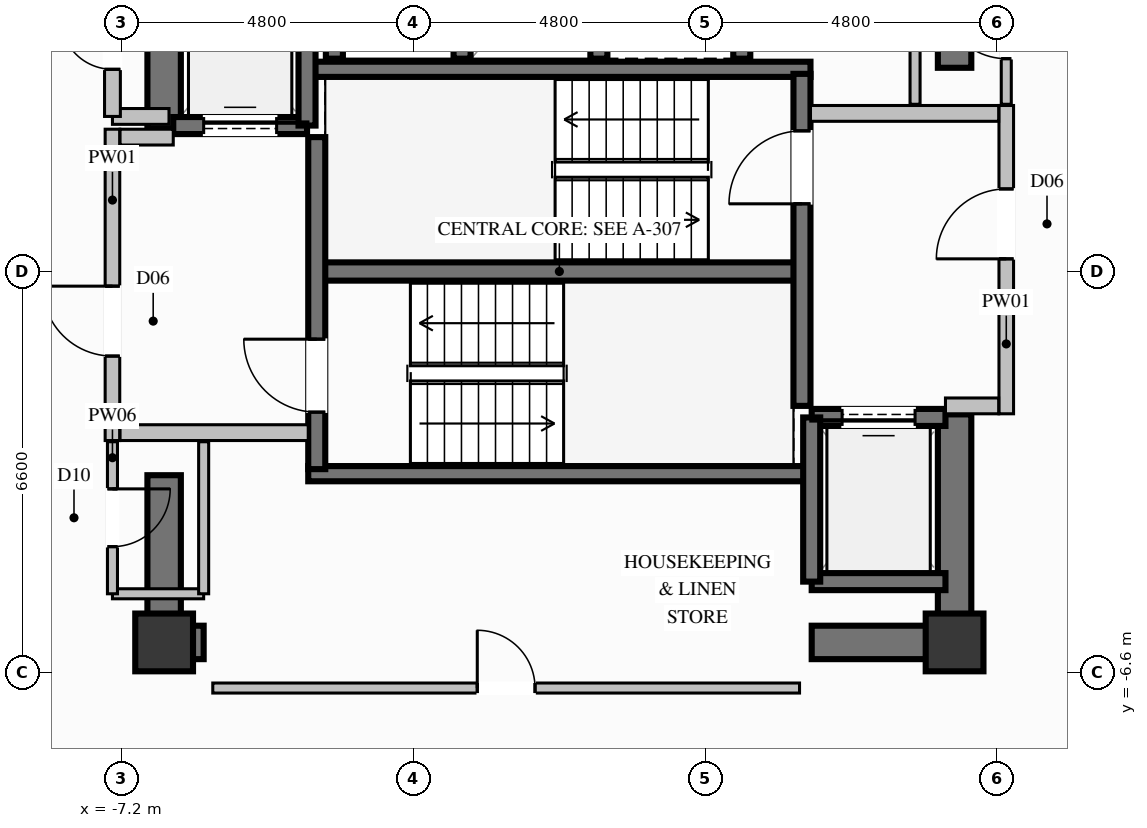
"""IFC4 building model, lengths in metres.
Left out: names, types, materials, properties, quantities, classifications, styles, units other than length and angle.
Written with IfcOpenShell. Run it as: python <this file> out.ifc"""

import sys

from ifc_helpers import new_model, si_unit, direction, frame, frame_2d, origin, origin_2d, place, context, subcontext, project, spatial, rectangle, extrude, element, fill, save


model = new_model("IFC4")
c1 = context("Model", 3, precision=1e-05, world=origin(), true_north=direction((0.0, 1.0)))
c2 = subcontext(c1, "Body", "Model", "MODEL_VIEW")
j1 = project(units=[si_unit("LENGTHUNIT", "METRE"), si_unit("PLANEANGLEUNIT", "RADIAN")], contexts=[c1])
p1 = place(None, origin())
s1 = spatial("IfcSite", under=j1, at=p1, CompositionType="ELEMENT")
p2 = place(p1, origin())
s2 = spatial("IfcBuilding", under=s1, at=p2, CompositionType="ELEMENT")
p3 = place(p2, frame((0.0, 0.0, 220.0)))
s3 = spatial("IfcBuildingStorey", under=s2, at=p3, CompositionType="ELEMENT", Elevation=220.0)
for number, where, z_axis, x_axis in (
    (1, (-6.5, -6.1, 0.0), (0.0, 0.0, 1.0), (1.0, 0.0, 0.0)),
    (2, (6.5, -6.1, 0.0), (0.0, 0.0, 1.0), (1.0, 0.0, 0.0)),
):
    element("IfcColumn", number, at=place(p3, frame(where, z_axis=z_axis, x_axis=x_axis)), inside=s3, PredefinedType="COLUMN", context=c2, shape_type="SweptSolid", body=[
        extrude(rectangle(XDim=0.95, YDim=0.95, at=origin_2d()), origin(), (0.0, 0.0, 1.0), 3.6),
    ])
p4 = place(p3, frame((-3.99, 0.0, 0.0), z_axis=(0.0, 0.0, 1.0), x_axis=(1.0, 0.0, 0.0)))
e3 = element("IfcWall", 3, at=p4, inside=s3, PredefinedType="SHEAR", context=c2, shape_type="SweptSolid", body=[
    extrude(rectangle(XDim=7.98, YDim=0.3, at=frame_2d((3.99, 0.0))), origin(), (0.0, 0.0, 1.0), 3.6),
])
for number, where, z_axis, x_axis in (
    (4, (-4.13, -3.325, 0.0), (0.0, 0.0, 1.0), (1.0, 0.0, 0.0)),
    (5, (-4.13, 3.325, 0.0), (0.0, 0.0, 1.0), (1.0, 0.0, 0.0)),
):
    element("IfcWall", number, at=place(p3, frame(where, z_axis=z_axis, x_axis=x_axis)), inside=s3, PredefinedType="SOLIDWALL", context=c2, shape_type="SweptSolid", body=[
        extrude(rectangle(XDim=8.26, YDim=0.25, at=frame_2d((4.13, 0.0))), origin(), (0.0, 0.0, 1.0), 3.6),
    ])
p5 = place(p3, frame((-6.225, -6.1, 0.0), z_axis=(0.0, 0.0, 1.0), x_axis=(1.0, 0.0, 0.0)))
e6 = element("IfcWall", 6, at=p5, inside=s3, PredefinedType="SHEAR", context=c2, shape_type="SweptSolid", body=[
    extrude(rectangle(XDim=0.375, YDim=0.55, at=frame_2d((0.188, 0.0))), origin(), (0.0, 0.0, 1.0), 3.6),
])
p6 = place(p3, frame((4.15, -6.1, 0.0), z_axis=(0.0, 0.0, 1.0), x_axis=(1.0, 0.0, 0.0)))
e7 = element("IfcWall", 7, at=p6, inside=s3, PredefinedType="SHEAR", context=c2, shape_type="SweptSolid", body=[
    extrude(rectangle(XDim=2.075, YDim=0.55, at=frame_2d((1.038, 0.0))), origin(), (0.0, 0.0, 1.0), 3.6),
])
p7 = place(p3, frame((-6.5, 2.35, 0.0), z_axis=(0.0, 0.0, 1.0), x_axis=(0.0, 1.0, 0.0)))
e8 = element("IfcWall", 8, at=p7, inside=s3, PredefinedType="SHEAR", context=c2, shape_type="SweptSolid", body=[
    extrude(rectangle(XDim=4.025, YDim=0.55, at=frame_2d((2.012, 0.0))), origin(), (0.0, 0.0, 1.0), 3.6),
])
p8 = place(p3, frame((-6.5, -6.375, 0.0), z_axis=(0.0, 0.0, 1.0), x_axis=(0.0, 1.0, 0.0)))
e9 = element("IfcWall", 9, at=p8, inside=s3, PredefinedType="SHEAR", context=c2, shape_type="SweptSolid", body=[
    extrude(rectangle(XDim=3.025, YDim=0.55, at=frame_2d((1.512, 0.0))), origin(), (0.0, 0.0, 1.0), 3.6),
])
p9 = place(p3, frame((6.5, -6.375, 0.0), z_axis=(0.0, 0.0, 1.0), x_axis=(0.0, 1.0, 0.0)))
e10 = element("IfcWall", 10, at=p9, inside=s3, PredefinedType="SHEAR", context=c2, shape_type="SweptSolid", body=[
    extrude(rectangle(XDim=4.025, YDim=0.55, at=frame_2d((2.012, 0.0))), origin(), (0.0, 0.0, 1.0), 3.6),
])
p10 = place(p3, frame((6.5, 3.35, 0.0), z_axis=(0.0, 0.0, 1.0), x_axis=(0.0, 1.0, 0.0)))
e11 = element("IfcWall", 11, at=p10, inside=s3, PredefinedType="SHEAR", context=c2, shape_type="SweptSolid", body=[
    extrude(rectangle(XDim=3.025, YDim=0.55, at=frame_2d((1.512, 0.0))), origin(), (0.0, 0.0, 1.0), 3.6),
])
for number, where, z_axis, x_axis in (
    (12, (-3.7, 6.0, 0.0), (0.0, 0.0, 1.0), (0.0, -1.0, 0.0)),
    (13, (-1.6, 3.5, 0.0), (0.0, 0.0, 1.0), (0.0, 1.0, 0.0)),
    (14, (0.65, 3.5, 0.0), (0.0, 0.0, 1.0), (0.0, 1.0, 0.0)),
    (15, (3.0, 3.5, 0.0), (0.0, 0.0, 1.0), (0.0, 1.0, 0.0)),
):
    element("IfcWall", number, at=place(p3, frame(where, z_axis=z_axis, x_axis=x_axis)), inside=s3, PredefinedType="SOLIDWALL", context=c2, shape_type="SweptSolid", body=[
        extrude(rectangle(XDim=2.5, YDim=0.28, at=frame_2d((1.25, 0.0))), origin(), (0.0, 0.0, 1.0), 3.36),
    ])
p11 = place(p3, frame((-6.35, 2.4, 0.0), z_axis=(0.0, 0.0, 1.0), x_axis=(1.0, 0.0, 0.0)))
e16 = element("IfcWall", 16, at=p11, inside=s3, PredefinedType="SOLIDWALL", context=c2, shape_type="SweptSolid", body=[
    extrude(rectangle(XDim=2.2, YDim=0.28, at=frame_2d((1.1, 0.0))), origin(), (0.0, 0.0, 1.0), 3.36),
])
p12 = place(p11, frame((0.5, 0.0, 0.0)))
e17 = element("IfcOpeningElement", 17, at=p12, cuts=e16, PredefinedType="OPENING", context=c2, shape_type="SweptSolid", body=[
    extrude(rectangle(XDim=1.2, YDim=2.2, at=frame_2d((0.6, 1.1))), frame((0.0, 0.15, 0.0), z_axis=(0.0, -1.0, 0.0), x_axis=(1.0, 0.0, 0.0)), (0.0, 0.0, 1.0), 0.3),
])
p13 = place(p3, frame((-4.15, 2.4, 0.0), z_axis=(0.0, 0.0, 1.0), x_axis=(0.0, 1.0, 0.0)))
e18 = element("IfcWall", 18, at=p13, inside=s3, PredefinedType="SOLIDWALL", context=c2, shape_type="SweptSolid", body=[
    extrude(rectangle(XDim=2.7, YDim=0.28, at=frame_2d((1.35, 0.0))), origin(), (0.0, 0.0, 1.0), 3.36),
])
p14 = place(p3, frame((4.15, -5.1, 0.0), z_axis=(0.0, 0.0, 1.0), x_axis=(1.0, 0.0, 0.0)))
e19 = element("IfcWall", 19, at=p14, inside=s3, PredefinedType="SOLIDWALL", context=c2, shape_type="SweptSolid", body=[
    extrude(rectangle(XDim=2.2, YDim=0.28, at=frame_2d((1.1, 0.0))), origin(), (0.0, 0.0, 1.0), 3.36),
])
p15 = place(p3, frame((6.35, -2.4, 0.0), z_axis=(0.0, 0.0, 1.0), x_axis=(-1.0, 0.0, 0.0)))
e20 = element("IfcWall", 20, at=p15, inside=s3, PredefinedType="SOLIDWALL", context=c2, shape_type="SweptSolid", body=[
    extrude(rectangle(XDim=2.2, YDim=0.28, at=frame_2d((1.1, 0.0))), origin(), (0.0, 0.0, 1.0), 3.36),
])
p16 = place(p15, frame((0.5, 0.0, 0.0)))
e21 = element("IfcOpeningElement", 21, at=p16, cuts=e20, PredefinedType="OPENING", context=c2, shape_type="SweptSolid", body=[
    extrude(rectangle(XDim=1.2, YDim=2.2, at=frame_2d((0.6, 1.1))), frame((0.0, 0.15, 0.0), z_axis=(0.0, -1.0, 0.0), x_axis=(1.0, 0.0, 0.0)), (0.0, 0.0, 1.0), 0.3),
])
p17 = place(p3, frame((4.15, -2.4, 0.0), z_axis=(0.0, 0.0, 1.0), x_axis=(0.0, -1.0, 0.0)))
e22 = element("IfcWall", 22, at=p17, inside=s3, PredefinedType="SOLIDWALL", context=c2, shape_type="SweptSolid", body=[
    extrude(rectangle(XDim=2.7, YDim=0.28, at=frame_2d((1.35, 0.0))), origin(), (0.0, 0.0, 1.0), 3.36),
])
p18 = place(p3, frame((-3.99, -3.25, 0.0), z_axis=(0.0, 0.0, 1.0), x_axis=(0.0, 1.0, 0.0)))
e23 = element("IfcWall", 23, at=p18, inside=s3, PredefinedType="SOLIDWALL", context=c2, shape_type="SweptSolid", body=[
    extrude(rectangle(XDim=5.46, YDim=0.28, at=frame_2d((2.73, 0.0))), origin(), (0.0, 0.0, 1.0), 3.36),
])
p19 = place(p18, frame((0.937, 0.0, 0.0)))
e24 = element("IfcOpeningElement", 24, at=p19, cuts=e23, PredefinedType="OPENING", context=c2, shape_type="SweptSolid", body=[
    extrude(rectangle(XDim=1.2, YDim=2.2, at=frame_2d((0.6, 1.1))), frame((0.0, 0.15, 0.0), z_axis=(0.0, -1.0, 0.0), x_axis=(1.0, 0.0, 0.0)), (0.0, 0.0, 1.0), 0.3),
])
p20 = place(p3, frame((3.99, -2.21, 0.0), z_axis=(0.0, 0.0, 1.0), x_axis=(0.0, 1.0, 0.0)))
e25 = element("IfcWall", 25, at=p20, inside=s3, PredefinedType="SOLIDWALL", context=c2, shape_type="SweptSolid", body=[
    extrude(rectangle(XDim=5.46, YDim=0.28, at=frame_2d((2.73, 0.0))), origin(), (0.0, 0.0, 1.0), 3.36),
])
p21 = place(p20, frame((3.323, 0.0, 0.0)))
e26 = element("IfcOpeningElement", 26, at=p21, cuts=e25, PredefinedType="OPENING", context=c2, shape_type="SweptSolid", body=[
    extrude(rectangle(XDim=1.2, YDim=2.2, at=frame_2d((0.6, 1.1))), frame((0.0, 0.15, 0.0), z_axis=(0.0, -1.0, 0.0), x_axis=(1.0, 0.0, 0.0)), (0.0, 0.0, 1.0), 0.3),
])
p22 = place(p3, frame((-7.35, -2.78, 0.0), z_axis=(0.0, 0.0, 1.0), x_axis=(0.0, 1.0, 0.0)))
e27 = element("IfcWall", 27, at=p22, inside=s3, PredefinedType="PARTITIONING", context=c2, shape_type="SweptSolid", body=[
    extrude(rectangle(XDim=5.12, YDim=0.24, at=frame_2d((2.56, 0.0))), origin(), (0.0, 0.0, 1.0), 2.445),
])
p23 = place(p22, frame((1.389, 0.0, 0.0)))
e28 = element("IfcOpeningElement", 28, at=p23, cuts=e27, PredefinedType="OPENING", context=c2, shape_type="SweptSolid", body=[
    extrude(rectangle(XDim=1.15, YDim=2.2, at=frame_2d((0.575, 1.1))), frame((0.0, 0.13, 0.0), z_axis=(0.0, -1.0, 0.0), x_axis=(1.0, 0.0, 0.0)), (0.0, 0.0, 1.0), 0.26),
])
p24 = place(p3, frame((-7.225, -2.65, 0.0), z_axis=(0.0, 0.0, 1.0), x_axis=(1.0, 0.0, 0.0)))
e29 = element("IfcWall", 29, at=p24, inside=s3, PredefinedType="PARTITIONING", context=c2, shape_type="SweptSolid", body=[
    extrude(rectangle(XDim=3.095, YDim=0.26, at=frame_2d((1.548, 0.0))), origin(), (0.0, 0.0, 1.0), 3.36),
])
p25 = place(p3, frame((-7.225, 2.21, 0.0), z_axis=(0.0, 0.0, 1.0), x_axis=(1.0, 0.0, 0.0)))
e30 = element("IfcWall", 30, at=p25, inside=s3, PredefinedType="PARTITIONING", context=c2, shape_type="SweptSolid", body=[
    extrude(rectangle(XDim=0.875, YDim=0.26, at=frame_2d((0.438, 0.0))), origin(), (0.0, 0.0, 1.0), 3.36),
])
p26 = place(p3, frame((7.35, -2.34, 0.0), z_axis=(0.0, 0.0, 1.0), x_axis=(0.0, 1.0, 0.0)))
e31 = element("IfcWall", 31, at=p26, inside=s3, PredefinedType="PARTITIONING", context=c2, shape_type="SweptSolid", body=[
    extrude(rectangle(XDim=5.07, YDim=0.24, at=frame_2d((2.535, 0.0))), origin(), (0.0, 0.0, 1.0), 2.445),
])
p27 = place(p26, frame((2.548, 0.0, 0.0)))
e32 = element("IfcOpeningElement", 32, at=p27, cuts=e31, PredefinedType="OPENING", context=c2, shape_type="SweptSolid", body=[
    extrude(rectangle(XDim=1.15, YDim=2.2, at=frame_2d((0.575, 1.1))), frame((0.0, 0.13, 0.0), z_axis=(0.0, -1.0, 0.0), x_axis=(1.0, 0.0, 0.0)), (0.0, 0.0, 1.0), 0.26),
])
p28 = place(p3, frame((6.35, -2.21, 0.0), z_axis=(0.0, 0.0, 1.0), x_axis=(1.0, 0.0, 0.0)))
e33 = element("IfcWall", 33, at=p28, inside=s3, PredefinedType="PARTITIONING", context=c2, shape_type="SweptSolid", body=[
    extrude(rectangle(XDim=0.875, YDim=0.26, at=frame_2d((0.438, 0.0))), origin(), (0.0, 0.0, 1.0), 3.36),
])
p29 = place(p3, frame((4.13, 2.6, 0.0), z_axis=(0.0, 0.0, 1.0), x_axis=(1.0, 0.0, 0.0)))
e34 = element("IfcWall", 34, at=p29, inside=s3, PredefinedType="PARTITIONING", context=c2, shape_type="SweptSolid", body=[
    extrude(rectangle(XDim=3.095, YDim=0.26, at=frame_2d((1.548, 0.0))), origin(), (0.0, 0.0, 1.0), 3.36),
])
p30 = place(p3, frame((-7.35, 2.55, 0.0), z_axis=(0.0, 0.0, 1.0), x_axis=(1.0, 0.0, 0.0)))
e35 = element("IfcWall", 35, at=p30, inside=s3, PredefinedType="PARTITIONING", context=c2, shape_type="SweptSolid", body=[
    extrude(rectangle(XDim=0.93, YDim=0.26, at=frame_2d((0.465, 0.0))), origin(), (0.0, 0.0, 1.0), 3.36),
])
p31 = place(p3, frame((-7.35, 2.55, 0.0), z_axis=(0.0, 0.0, 1.0), x_axis=(0.0, 1.0, 0.0)))
e36 = element("IfcWall", 36, at=p31, inside=s3, PredefinedType="PARTITIONING", context=c2, shape_type="SweptSolid", body=[
    extrude(rectangle(XDim=2.4, YDim=0.26, at=frame_2d((1.2, 0.0))), origin(), (0.0, 0.0, 1.0), 2.445),
])
p32 = place(p31, frame((0.775, 0.0, 0.0)))
e37 = element("IfcOpeningElement", 37, at=p32, cuts=e36, PredefinedType="OPENING", context=c2, shape_type="SweptSolid", body=[
    extrude(rectangle(XDim=0.85, YDim=2.05, at=frame_2d((0.425, 1.025))), frame((0.0, 0.14, 0.0), z_axis=(0.0, -1.0, 0.0), x_axis=(1.0, 0.0, 0.0)), (0.0, 0.0, 1.0), 0.28),
])
p33 = place(p3, frame((-7.35, -5.3, 0.0), z_axis=(0.0, 0.0, 1.0), x_axis=(1.0, 0.0, 0.0)))
e38 = element("IfcWall", 38, at=p33, inside=s3, PredefinedType="PARTITIONING", context=c2, shape_type="SweptSolid", body=[
    extrude(rectangle(XDim=1.5, YDim=0.165, at=frame_2d((0.75, 0.0))), origin(), (0.0, 0.0, 1.0), 2.445),
])
p34 = place(p3, frame((-5.85, -5.3, 0.0), z_axis=(0.0, 0.0, 1.0), x_axis=(0.0, 1.0, 0.0)))
e39 = element("IfcWall", 39, at=p34, inside=s3, PredefinedType="PARTITIONING", context=c2, shape_type="SweptSolid", body=[
    extrude(rectangle(XDim=2.5, YDim=0.165, at=frame_2d((1.25, 0.0))), origin(), (0.0, 0.0, 1.0), 2.445),
])
p35 = place(p3, frame((-7.35, -2.8, 0.0), z_axis=(0.0, 0.0, 1.0), x_axis=(0.0, -1.0, 0.0)))
e40 = element("IfcWall", 40, at=p35, inside=s3, PredefinedType="PARTITIONING", context=c2, shape_type="SweptSolid", body=[
    extrude(rectangle(XDim=2.5, YDim=0.165, at=frame_2d((1.25, 0.0))), origin(), (0.0, 0.0, 1.0), 3.36),
])
p36 = place(p35, frame((0.775, 0.0, 0.0)))
e41 = element("IfcOpeningElement", 41, at=p36, cuts=e40, PredefinedType="OPENING", context=c2, shape_type="SweptSolid", body=[
    extrude(rectangle(XDim=0.95, YDim=2.1, at=frame_2d((0.475, 1.05))), frame((0.0, 0.093, 0.0), z_axis=(0.0, -1.0, 0.0), x_axis=(1.0, 0.0, 0.0)), (0.0, 0.0, 1.0), 0.185),
])
p37 = place(p3, frame((7.35, 2.75, 0.0), z_axis=(0.0, 0.0, 1.0), x_axis=(0.0, 1.0, 0.0)))
e42 = element("IfcWall", 42, at=p37, inside=s3, PredefinedType="PARTITIONING", context=c2, shape_type="SweptSolid", body=[
    extrude(rectangle(XDim=2.55, YDim=0.165, at=frame_2d((1.275, 0.0))), origin(), (0.0, 0.0, 1.0), 3.36),
])
p38 = place(p37, frame((0.75, 0.0, 0.0)))
e43 = element("IfcOpeningElement", 43, at=p38, cuts=e42, PredefinedType="OPENING", context=c2, shape_type="SweptSolid", body=[
    extrude(rectangle(XDim=1.05, YDim=2.15, at=frame_2d((0.525, 1.075))), frame((0.0, 0.093, 0.0), z_axis=(0.0, -1.0, 0.0), x_axis=(1.0, 0.0, 0.0)), (0.0, 0.0, 1.0), 0.185),
])
p39 = place(p3, frame((5.85, 5.3, 0.0), z_axis=(0.0, 0.0, 1.0), x_axis=(0.0, -1.0, 0.0)))
e44 = element("IfcWall", 44, at=p39, inside=s3, PredefinedType="PARTITIONING", context=c2, shape_type="SweptSolid", body=[
    extrude(rectangle(XDim=2.55, YDim=0.165, at=frame_2d((1.275, 0.0))), origin(), (0.0, 0.0, 1.0), 2.445),
])
p40 = place(p3, frame((-5.7, -6.85, 0.0), z_axis=(0.0, 0.0, 1.0), x_axis=(1.0, 0.0, 0.0)))
e45 = element("IfcWall", 45, at=p40, inside=s3, PredefinedType="PARTITIONING", context=c2, shape_type="SweptSolid", body=[
    extrude(rectangle(XDim=9.65, YDim=0.165, at=frame_2d((4.825, 0.0))), origin(), (0.0, 0.0, 1.0), 2.445),
])
p41 = place(p40, frame((4.35, 0.0, 0.0)))
e46 = element("IfcOpeningElement", 46, at=p41, cuts=e45, PredefinedType="OPENING", context=c2, shape_type="SweptSolid", body=[
    extrude(rectangle(XDim=0.95, YDim=2.1, at=frame_2d((0.475, 1.05))), frame((0.0, 0.093, 0.0), z_axis=(0.0, -1.0, 0.0), x_axis=(1.0, 0.0, 0.0)), (0.0, 0.0, 1.0), 0.185),
])
p42 = place(p12, origin())
e47 = element("IfcDoor", 47, at=p42, inside=s3, OperationType="SLIDING_TO_LEFT", PredefinedType="DOOR", context=c2, shape_type="SweptSolid", body=[
    extrude(rectangle(XDim=1.2, YDim=2.2, at=frame_2d((0.6, 1.1))), frame((0.0, 0.025, 0.0), z_axis=(0.0, -1.0, 0.0), x_axis=(1.0, 0.0, 0.0)), (0.0, 0.0, 1.0), 0.05),
])
fill(e17, e47)
p43 = place(p16, origin())
e48 = element("IfcDoor", 48, at=p43, inside=s3, OperationType="SLIDING_TO_LEFT", PredefinedType="DOOR", context=c2, shape_type="SweptSolid", body=[
    extrude(rectangle(XDim=1.2, YDim=2.2, at=frame_2d((0.6, 1.1))), frame((0.0, 0.025, 0.0), z_axis=(0.0, -1.0, 0.0), x_axis=(1.0, 0.0, 0.0)), (0.0, 0.0, 1.0), 0.05),
])
fill(e21, e48)
p44 = place(p19, origin())
e49 = element("IfcDoor", 49, at=p44, inside=s3, OperationType="SINGLE_SWING_RIGHT", PredefinedType="DOOR", context=c2, shape_type="SweptSolid", body=[
    extrude(rectangle(XDim=1.2, YDim=2.2, at=frame_2d((0.6, 1.1))), frame((0.0, 0.025, 0.0), z_axis=(0.0, -1.0, 0.0), x_axis=(1.0, 0.0, 0.0)), (0.0, 0.0, 1.0), 0.05),
])
fill(e24, e49)
p45 = place(p21, origin())
e50 = element("IfcDoor", 50, at=p45, inside=s3, OperationType="SINGLE_SWING_LEFT", PredefinedType="DOOR", context=c2, shape_type="SweptSolid", body=[
    extrude(rectangle(XDim=1.2, YDim=2.2, at=frame_2d((0.6, 1.1))), frame((0.0, 0.025, 0.0), z_axis=(0.0, -1.0, 0.0), x_axis=(1.0, 0.0, 0.0)), (0.0, 0.0, 1.0), 0.05),
])
fill(e26, e50)
p46 = place(p23, origin())
e51 = element("IfcDoor", 51, at=p46, inside=s3, OperationType="SINGLE_SWING_RIGHT", PredefinedType="DOOR", context=c2, shape_type="SweptSolid", body=[
    extrude(rectangle(XDim=1.15, YDim=2.2, at=frame_2d((0.575, 1.1))), frame((0.0, 0.025, 0.0), z_axis=(0.0, -1.0, 0.0), x_axis=(1.0, 0.0, 0.0)), (0.0, 0.0, 1.0), 0.05),
])
fill(e28, e51)
p47 = place(p27, origin())
e52 = element("IfcDoor", 52, at=p47, inside=s3, OperationType="SINGLE_SWING_LEFT", PredefinedType="DOOR", context=c2, shape_type="SweptSolid", body=[
    extrude(rectangle(XDim=1.15, YDim=2.2, at=frame_2d((0.575, 1.1))), frame((0.0, 0.025, 0.0), z_axis=(0.0, -1.0, 0.0), x_axis=(1.0, 0.0, 0.0)), (0.0, 0.0, 1.0), 0.05),
])
fill(e32, e52)
p48 = place(p32, origin())
e53 = element("IfcDoor", 53, at=p48, inside=s3, OperationType="SINGLE_SWING_RIGHT", PredefinedType="DOOR", context=c2, shape_type="SweptSolid", body=[
    extrude(rectangle(XDim=0.85, YDim=2.05, at=frame_2d((0.425, 1.025))), frame((0.0, 0.025, 0.0), z_axis=(0.0, -1.0, 0.0), x_axis=(1.0, 0.0, 0.0)), (0.0, 0.0, 1.0), 0.05),
])
fill(e37, e53)
p49 = place(p36, origin())
e54 = element("IfcDoor", 54, at=p49, inside=s3, OperationType="SINGLE_SWING_LEFT", PredefinedType="DOOR", context=c2, shape_type="SweptSolid", body=[
    extrude(rectangle(XDim=0.95, YDim=2.1, at=frame_2d((0.475, 1.05))), frame((0.0, 0.025, 0.0), z_axis=(0.0, -1.0, 0.0), x_axis=(1.0, 0.0, 0.0)), (0.0, 0.0, 1.0), 0.05),
])
fill(e41, e54)
p50 = place(p38, origin())
e55 = element("IfcDoor", 55, at=p50, inside=s3, OperationType="SINGLE_SWING_RIGHT", PredefinedType="DOOR", context=c2, shape_type="SweptSolid", body=[
    extrude(rectangle(XDim=1.05, YDim=2.15, at=frame_2d((0.525, 1.075))), frame((0.0, 0.025, 0.0), z_axis=(0.0, -1.0, 0.0), x_axis=(1.0, 0.0, 0.0)), (0.0, 0.0, 1.0), 0.05),
])
fill(e43, e55)
p51 = place(p41, origin())
e56 = element("IfcDoor", 56, at=p51, inside=s3, OperationType="SINGLE_SWING_LEFT", PredefinedType="DOOR", context=c2, shape_type="SweptSolid", body=[
    extrude(rectangle(XDim=0.95, YDim=2.1, at=frame_2d((0.475, 1.05))), frame((0.0, 0.025, 0.0), z_axis=(0.0, -1.0, 0.0), x_axis=(1.0, 0.0, 0.0)), (0.0, 0.0, 1.0), 0.05),
])
fill(e46, e56)
save(model, sys.argv[1])
